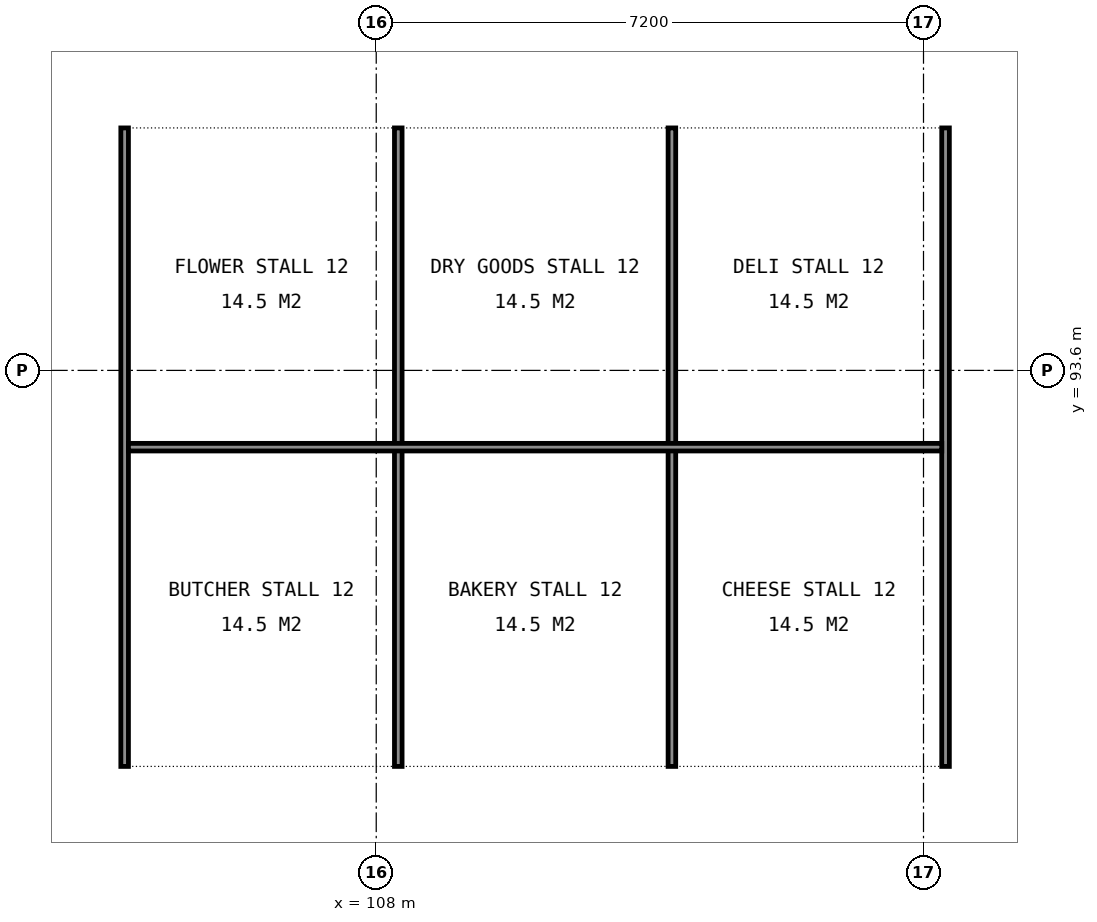
"""IFC4 building model, lengths in metres.
Left out: names, types, materials, properties, quantities, classifications, styles, units other than length and angle.
Written with IfcOpenShell. Run it as: python <this file> out.ifc"""

import sys

from ifc_helpers import new_model, si_unit, direction, frame, frame_2d, origin, place, context, subcontext, project, spatial, rectangle, extrude, element, save


model = new_model("IFC4")
c1 = context("Model", 3, precision=1e-05, world=origin(), true_north=direction((0.0, 1.0)))
c2 = subcontext(c1, "Body", "Model", "MODEL_VIEW")
j1 = project(units=[si_unit("LENGTHUNIT", "METRE"), si_unit("PLANEANGLEUNIT", "RADIAN")], contexts=[c1])
p1 = place(None, origin())
s1 = spatial("IfcSite", under=j1, at=p1, CompositionType="ELEMENT")
p2 = place(p1, origin())
s2 = spatial("IfcBuilding", under=s1, at=p2, CompositionType="ELEMENT")
p3 = place(p2, origin())
s3 = spatial("IfcBuildingStorey", under=s2, at=p3, CompositionType="ELEMENT", Elevation=0.0)
for number, where, z_axis, x_axis in (
    (1, (104.69, 88.39, 0.0), (0.0, 0.0, 1.0), (0.0, 1.0, 0.0)),
    (2, (108.29, 88.39, 0.0), (0.0, 0.0, 1.0), (0.0, 1.0, 0.0)),
    (3, (111.89, 88.39, 0.0), (0.0, 0.0, 1.0), (0.0, 1.0, 0.0)),
    (4, (115.49, 88.39, 0.0), (0.0, 0.0, 1.0), (0.0, 1.0, 0.0)),
):
    element("IfcWall", number, at=place(p3, frame(where, z_axis=z_axis, x_axis=x_axis)), inside=s3, PredefinedType="PARTITIONING", context=c2, shape_type="SweptSolid", body=[
        extrude(rectangle(XDim=8.4, YDim=0.1, at=frame_2d((4.2, 0.0))), origin(), (0.0, 0.0, 1.0), 1.2),
    ])
p4 = place(p3, frame((104.74, 92.59, 0.0), z_axis=(0.0, 0.0, 1.0), x_axis=(1.0, 0.0, 0.0)))
e5 = element("IfcWall", 5, at=p4, inside=s3, PredefinedType="PARTITIONING", context=c2, shape_type="SweptSolid", body=[
    extrude(rectangle(XDim=10.7, YDim=0.1, at=frame_2d((5.35, 0.0))), origin(), (0.0, 0.0, 1.0), 1.2),
])
save(model, sys.argv[1])
